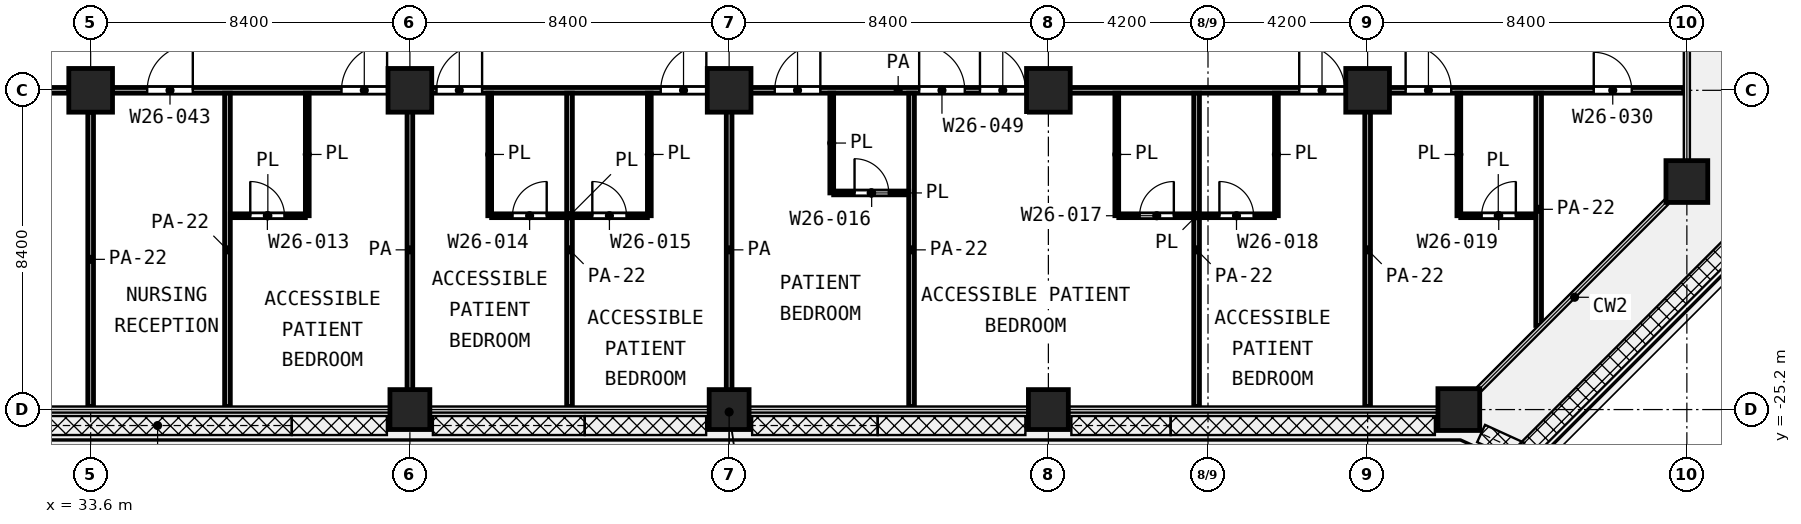
"""IFC4 building model, lengths in metres.
Left out: names, types, materials, properties, quantities, classifications, styles, units other than length and angle.
Written with IfcOpenShell. Run it as: python <this file> out.ifc"""

import sys

from ifc_helpers import new_model, si_unit, direction, frame, frame_2d, origin, origin_2d, place, context, subcontext, project, spatial, rectangle, extrude, element, fill, save


model = new_model("IFC4")
c1 = context("Model", 3, precision=1e-05, world=origin(), true_north=direction((0.0, 1.0)))
c2 = subcontext(c1, "Body", "Model", "MODEL_VIEW")
j1 = project(units=[si_unit("LENGTHUNIT", "METRE"), si_unit("PLANEANGLEUNIT", "RADIAN")], contexts=[c1])
p1 = place(None, origin())
s1 = spatial("IfcSite", under=j1, at=p1, CompositionType="ELEMENT")
p2 = place(p1, origin())
s2 = spatial("IfcBuilding", under=s1, at=p2, CompositionType="ELEMENT")
p3 = place(p2, frame((0.0, 0.0, 136.6)))
s3 = spatial("IfcBuildingStorey", under=s2, at=p3, CompositionType="ELEMENT", Elevation=136.6)
for number, where, z_axis, x_axis in (
    (1, (33.6, -16.8, 0.0), (0.0, 0.0, 1.0), (1.0, 0.0, 0.0)),
    (2, (42.0, -16.8, 0.0), (0.0, 0.0, 1.0), (1.0, 0.0, 0.0)),
    (3, (50.4, -16.8, 0.0), (0.0, 0.0, 1.0), (1.0, 0.0, 0.0)),
    (4, (58.8, -16.8, 0.0), (0.0, 0.0, 1.0), (1.0, 0.0, 0.0)),
    (5, (67.2, -16.8, 0.0), (0.0, 0.0, 1.0), (1.0, 0.0, 0.0)),
):
    element("IfcColumn", number, at=place(p3, frame(where, z_axis=z_axis, x_axis=x_axis)), inside=s3, PredefinedType="COLUMN", context=c2, shape_type="SweptSolid", body=[
        extrude(rectangle(XDim=1.15, YDim=1.15, at=origin_2d()), origin(), (0.0, 0.0, 1.0), 4.2),
    ])
p4 = place(p3, frame((75.6, -19.2, 0.0), z_axis=(0.0, 0.0, 1.0), x_axis=(1.0, 0.0, 0.0)))
e6 = element("IfcColumn", 6, at=p4, inside=s3, PredefinedType="COLUMN", context=c2, shape_type="SweptSolid", body=[
    extrude(rectangle(XDim=1.1, YDim=1.1, at=origin_2d()), origin(), (0.0, 0.0, 1.0), 4.2),
])
for number, where, z_axis, x_axis in (
    (7, (42.0, -25.2, 0.0), (0.0, 0.0, 1.0), (1.0, 0.0, 0.0)),
    (8, (50.4, -25.2, 0.0), (0.0, 0.0, 1.0), (1.0, 0.0, 0.0)),
    (9, (58.8, -25.2, 0.0), (0.0, 0.0, 1.0), (1.0, 0.0, 0.0)),
):
    element("IfcColumn", number, at=place(p3, frame(where, z_axis=z_axis, x_axis=x_axis)), inside=s3, PredefinedType="COLUMN", context=c2, shape_type="SweptSolid", body=[
        extrude(rectangle(XDim=1.05, YDim=1.05, at=origin_2d()), origin(), (0.0, 0.0, 1.0), 4.2),
    ])
p5 = place(p3, frame((69.6, -25.2, 0.0), z_axis=(0.0, 0.0, 1.0), x_axis=(1.0, 0.0, 0.0)))
e10 = element("IfcColumn", 10, at=p5, inside=s3, PredefinedType="COLUMN", context=c2, shape_type="SweptSolid", body=[
    extrude(rectangle(XDim=1.1, YDim=1.1, at=origin_2d()), origin(), (0.0, 0.0, 1.0), 4.2),
])
p6 = place(p3, frame((37.275, -20.1, 0.0), z_axis=(0.0, 0.0, 1.0), x_axis=(1.0, 0.0, 0.0)))
e11 = element("IfcWall", 11, at=p6, inside=s3, PredefinedType="PARTITIONING", context=c2, shape_type="SweptSolid", body=[
    extrude(rectangle(XDim=1.975, YDim=0.1, at=frame_2d((0.988, 0.0))), origin(), (0.0, 0.0, 1.0), 3.6),
])
p7 = place(p6, frame((0.525, 0.0, 0.0)))
e12 = element("IfcOpeningElement", 12, at=p7, cuts=e11, PredefinedType="OPENING", context=c2, shape_type="SweptSolid", body=[
    extrude(rectangle(XDim=0.9, YDim=2.1, at=frame_2d((0.45, 1.05))), frame((0.0, 0.06, 0.0), z_axis=(0.0, -1.0, 0.0), x_axis=(1.0, 0.0, 0.0)), (0.0, 0.0, 1.0), 0.12),
])
p8 = place(p3, frame((44.15, -20.1, 0.0), z_axis=(0.0, 0.0, 1.0), x_axis=(1.0, 0.0, 0.0)))
e13 = element("IfcWall", 13, at=p8, inside=s3, PredefinedType="PARTITIONING", context=c2, shape_type="SweptSolid", body=[
    extrude(rectangle(XDim=4.1, YDim=0.1, at=frame_2d((2.05, 0.0))), origin(), (0.0, 0.0, 1.0), 3.6),
])
p9 = place(p8, frame((0.55, 0.0, 0.0)))
e14 = element("IfcOpeningElement", 14, at=p9, cuts=e13, PredefinedType="OPENING", context=c2, shape_type="SweptSolid", body=[
    extrude(rectangle(XDim=0.9, YDim=2.1, at=frame_2d((0.45, 1.05))), frame((0.0, 0.06, 0.0), z_axis=(0.0, -1.0, 0.0), x_axis=(1.0, 0.0, 0.0)), (0.0, 0.0, 1.0), 0.12),
])
p10 = place(p8, frame((2.65, 0.0, 0.0)))
e15 = element("IfcOpeningElement", 15, at=p10, cuts=e13, PredefinedType="OPENING", context=c2, shape_type="SweptSolid", body=[
    extrude(rectangle(XDim=0.9, YDim=2.1, at=frame_2d((0.45, 1.05))), frame((0.0, 0.06, 0.0), z_axis=(0.0, -1.0, 0.0), x_axis=(1.0, 0.0, 0.0)), (0.0, 0.0, 1.0), 0.12),
])
p11 = place(p3, frame((60.652, -20.1, 0.0), z_axis=(0.0, 0.0, 1.0), x_axis=(1.0, 0.0, 0.0)))
e16 = element("IfcWall", 16, at=p11, inside=s3, PredefinedType="PARTITIONING", context=c2, shape_type="SweptSolid", body=[
    extrude(rectangle(XDim=4.098, YDim=0.1, at=frame_2d((2.049, 0.0))), origin(), (0.0, 0.0, 1.0), 3.6),
])
p12 = place(p11, frame((0.549, 0.0, 0.0)))
e17 = element("IfcOpeningElement", 17, at=p12, cuts=e16, PredefinedType="OPENING", context=c2, shape_type="SweptSolid", body=[
    extrude(rectangle(XDim=0.9, YDim=2.1, at=frame_2d((0.45, 1.05))), frame((0.0, 0.06, 0.0), z_axis=(0.0, -1.0, 0.0), x_axis=(1.0, 0.0, 0.0)), (0.0, 0.0, 1.0), 0.12),
])
p13 = place(p11, frame((2.648, 0.0, 0.0)))
e18 = element("IfcOpeningElement", 18, at=p13, cuts=e16, PredefinedType="OPENING", context=c2, shape_type="SweptSolid", body=[
    extrude(rectangle(XDim=0.9, YDim=2.1, at=frame_2d((0.45, 1.05))), frame((0.0, 0.06, 0.0), z_axis=(0.0, -1.0, 0.0), x_axis=(1.0, 0.0, 0.0)), (0.0, 0.0, 1.0), 0.12),
])
p14 = place(p3, frame((69.65, -20.1, 0.0), z_axis=(0.0, 0.0, 1.0), x_axis=(1.0, 0.0, 0.0)))
e19 = element("IfcWall", 19, at=p14, inside=s3, PredefinedType="PARTITIONING", context=c2, shape_type="SweptSolid", body=[
    extrude(rectangle(XDim=1.975, YDim=0.1, at=frame_2d((0.988, 0.0))), origin(), (0.0, 0.0, 1.0), 3.6),
])
p15 = place(p14, frame((0.55, 0.0, 0.0)))
e20 = element("IfcOpeningElement", 20, at=p15, cuts=e19, PredefinedType="OPENING", context=c2, shape_type="SweptSolid", body=[
    extrude(rectangle(XDim=0.9, YDim=2.1, at=frame_2d((0.45, 1.05))), frame((0.0, 0.06, 0.0), z_axis=(0.0, -1.0, 0.0), x_axis=(1.0, 0.0, 0.0)), (0.0, 0.0, 1.0), 0.12),
])
p16 = place(p3, frame((53.15, -19.5, 0.0), z_axis=(0.0, 0.0, 1.0), x_axis=(1.0, 0.0, 0.0)))
e21 = element("IfcWall", 21, at=p16, inside=s3, PredefinedType="PARTITIONING", context=c2, shape_type="SweptSolid", body=[
    extrude(rectangle(XDim=1.975, YDim=0.1, at=frame_2d((0.988, 0.0))), origin(), (0.0, 0.0, 1.0), 3.6),
])
p17 = place(p16, frame((0.55, 0.0, 0.0)))
e22 = element("IfcOpeningElement", 22, at=p17, cuts=e21, PredefinedType="OPENING", context=c2, shape_type="SweptSolid", body=[
    extrude(rectangle(XDim=0.9, YDim=2.1, at=frame_2d((0.45, 1.05))), frame((0.0, 0.06, 0.0), z_axis=(0.0, -1.0, 0.0), x_axis=(1.0, 0.0, 0.0)), (0.0, 0.0, 1.0), 0.12),
])
for number, where, z_axis, x_axis in (
    (23, (39.3, -20.1, 0.0), (0.0, 0.0, 1.0), (0.0, 1.0, 0.0)),
    (24, (44.1, -20.1, 0.0), (0.0, 0.0, 1.0), (0.0, 1.0, 0.0)),
    (25, (48.3, -20.1, 0.0), (0.0, 0.0, 1.0), (0.0, 1.0, 0.0)),
):
    element("IfcWall", number, at=place(p3, frame(where, z_axis=z_axis, x_axis=x_axis)), inside=s3, PredefinedType="PARTITIONING", context=c2, shape_type="SweptSolid", body=[
        extrude(rectangle(XDim=3.225, YDim=0.1, at=frame_2d((1.613, 0.0))), origin(), (0.0, 0.0, 1.0), 3.6),
    ])
p18 = place(p3, frame((53.1, -19.5, 0.0), z_axis=(0.0, 0.0, 1.0), x_axis=(0.0, 1.0, 0.0)))
e26 = element("IfcWall", 26, at=p18, inside=s3, PredefinedType="PARTITIONING", context=c2, shape_type="SweptSolid", body=[
    extrude(rectangle(XDim=2.625, YDim=0.1, at=frame_2d((1.312, 0.0))), origin(), (0.0, 0.0, 1.0), 3.6),
])
p19 = place(p3, frame((60.6, -20.099, 0.0), z_axis=(0.0, 0.0, 1.0), x_axis=(0.0, 1.0, 0.0)))
e27 = element("IfcWall", 27, at=p19, inside=s3, PredefinedType="PARTITIONING", context=c2, shape_type="SweptSolid", body=[
    extrude(rectangle(XDim=3.224, YDim=0.1, at=frame_2d((1.612, 0.0))), origin(), (0.0, 0.0, 1.0), 3.6),
])
for number, where, z_axis, x_axis in (
    (28, (64.8, -20.1, 0.0), (0.0, 0.0, 1.0), (0.0, 1.0, 0.0)),
    (29, (69.6, -20.1, 0.0), (0.0, 0.0, 1.0), (0.0, 1.0, 0.0)),
):
    element("IfcWall", number, at=place(p3, frame(where, z_axis=z_axis, x_axis=x_axis)), inside=s3, PredefinedType="PARTITIONING", context=c2, shape_type="SweptSolid", body=[
        extrude(rectangle(XDim=3.225, YDim=0.1, at=frame_2d((1.613, 0.0))), origin(), (0.0, 0.0, 1.0), 3.6),
    ])
p20 = place(p3, frame((25.0, -16.8, 0.0), z_axis=(0.0, 0.0, 1.0), x_axis=(1.0, 0.0, 0.0)))
e30 = element("IfcWall", 30, at=p20, inside=s3, PredefinedType="PARTITIONING", context=c2, shape_type="SweptSolid", body=[
    extrude(rectangle(XDim=8.025, YDim=0.15, at=frame_2d((4.012, 0.0))), origin(), (0.0, 0.0, 1.0), 3.6),
])
p21 = place(p20, frame((1.55, 0.0, 0.0)))
e31 = element("IfcOpeningElement", 31, at=p21, cuts=e30, PredefinedType="OPENING", context=c2, shape_type="SweptSolid", body=[
    extrude(rectangle(XDim=1.5, YDim=2.1, at=frame_2d((0.75, 1.05))), frame((0.0, 0.085, 0.0), z_axis=(0.0, -1.0, 0.0), x_axis=(1.0, 0.0, 0.0)), (0.0, 0.0, 1.0), 0.17),
])
p22 = place(p20, frame((5.762, 0.0, 0.0)))
e32 = element("IfcOpeningElement", 32, at=p22, cuts=e30, PredefinedType="OPENING", context=c2, shape_type="SweptSolid", body=[
    extrude(rectangle(XDim=0.9, YDim=2.1, at=frame_2d((0.45, 1.05))), frame((0.0, 0.085, 0.0), z_axis=(0.0, -1.0, 0.0), x_axis=(1.0, 0.0, 0.0)), (0.0, 0.0, 1.0), 0.17),
])
p23 = place(p3, frame((34.175, -16.8, 0.0), z_axis=(0.0, 0.0, 1.0), x_axis=(1.0, 0.0, 0.0)))
e33 = element("IfcWall", 33, at=p23, inside=s3, PredefinedType="PARTITIONING", context=c2, shape_type="SweptSolid", body=[
    extrude(rectangle(XDim=41.345, YDim=0.15, at=frame_2d((20.672, 0.0))), origin(), (0.0, 0.0, 1.0), 3.6),
])
p24 = place(p23, frame((0.913, 0.0, 0.0)))
e34 = element("IfcOpeningElement", 34, at=p24, cuts=e33, PredefinedType="OPENING", context=c2, shape_type="SweptSolid", body=[
    extrude(rectangle(XDim=1.2, YDim=2.1, at=frame_2d((0.6, 1.05))), frame((0.0, 0.085, 0.0), z_axis=(0.0, -1.0, 0.0), x_axis=(1.0, 0.0, 0.0)), (0.0, 0.0, 1.0), 0.17),
])
p25 = place(p23, frame((6.025, 0.0, 0.0)))
e35 = element("IfcOpeningElement", 35, at=p25, cuts=e33, PredefinedType="OPENING", context=c2, shape_type="SweptSolid", body=[
    extrude(rectangle(XDim=1.2, YDim=2.1, at=frame_2d((0.6, 1.05))), frame((0.0, 0.085, 0.0), z_axis=(0.0, -1.0, 0.0), x_axis=(1.0, 0.0, 0.0)), (0.0, 0.0, 1.0), 0.17),
])
p26 = place(p23, frame((8.525, 0.0, 0.0)))
e36 = element("IfcOpeningElement", 36, at=p26, cuts=e33, PredefinedType="OPENING", context=c2, shape_type="SweptSolid", body=[
    extrude(rectangle(XDim=1.2, YDim=2.1, at=frame_2d((0.6, 1.05))), frame((0.0, 0.085, 0.0), z_axis=(0.0, -1.0, 0.0), x_axis=(1.0, 0.0, 0.0)), (0.0, 0.0, 1.0), 0.17),
])
p27 = place(p23, frame((14.425, 0.0, 0.0)))
e37 = element("IfcOpeningElement", 37, at=p27, cuts=e33, PredefinedType="OPENING", context=c2, shape_type="SweptSolid", body=[
    extrude(rectangle(XDim=1.2, YDim=2.1, at=frame_2d((0.6, 1.05))), frame((0.0, 0.085, 0.0), z_axis=(0.0, -1.0, 0.0), x_axis=(1.0, 0.0, 0.0)), (0.0, 0.0, 1.0), 0.17),
])
p28 = place(p23, frame((17.425, 0.0, 0.0)))
e38 = element("IfcOpeningElement", 38, at=p28, cuts=e33, PredefinedType="OPENING", context=c2, shape_type="SweptSolid", body=[
    extrude(rectangle(XDim=1.2, YDim=2.1, at=frame_2d((0.6, 1.05))), frame((0.0, 0.085, 0.0), z_axis=(0.0, -1.0, 0.0), x_axis=(1.0, 0.0, 0.0)), (0.0, 0.0, 1.0), 0.17),
])
p29 = place(p23, frame((22.825, 0.0, 0.0)))
e39 = element("IfcOpeningElement", 39, at=p29, cuts=e33, PredefinedType="OPENING", context=c2, shape_type="SweptSolid", body=[
    extrude(rectangle(XDim=1.2, YDim=2.1, at=frame_2d((0.6, 1.05))), frame((0.0, 0.085, 0.0), z_axis=(0.0, -1.0, 0.0), x_axis=(1.0, 0.0, 0.0)), (0.0, 0.0, 1.0), 0.17),
])
p30 = place(p23, frame((21.225, 0.0, 0.0)))
e40 = element("IfcOpeningElement", 40, at=p30, cuts=e33, PredefinedType="OPENING", context=c2, shape_type="SweptSolid", body=[
    extrude(rectangle(XDim=1.2, YDim=2.1, at=frame_2d((0.6, 1.05))), frame((0.0, 0.085, 0.0), z_axis=(0.0, -1.0, 0.0), x_axis=(1.0, 0.0, 0.0)), (0.0, 0.0, 1.0), 0.17),
])
p31 = place(p23, frame((31.225, 0.0, 0.0)))
e41 = element("IfcOpeningElement", 41, at=p31, cuts=e33, PredefinedType="OPENING", context=c2, shape_type="SweptSolid", body=[
    extrude(rectangle(XDim=1.2, YDim=2.1, at=frame_2d((0.6, 1.05))), frame((0.0, 0.085, 0.0), z_axis=(0.0, -1.0, 0.0), x_axis=(1.0, 0.0, 0.0)), (0.0, 0.0, 1.0), 0.17),
])
p32 = place(p23, frame((34.025, 0.0, 0.0)))
e42 = element("IfcOpeningElement", 42, at=p32, cuts=e33, PredefinedType="OPENING", context=c2, shape_type="SweptSolid", body=[
    extrude(rectangle(XDim=1.2, YDim=2.1, at=frame_2d((0.6, 1.05))), frame((0.0, 0.085, 0.0), z_axis=(0.0, -1.0, 0.0), x_axis=(1.0, 0.0, 0.0)), (0.0, 0.0, 1.0), 0.17),
])
p33 = place(p23, frame((38.975, 0.0, 0.0)))
e43 = element("IfcOpeningElement", 43, at=p33, cuts=e33, PredefinedType="OPENING", context=c2, shape_type="SweptSolid", body=[
    extrude(rectangle(XDim=1.0, YDim=2.1, at=frame_2d((0.5, 1.05))), frame((0.0, 0.085, 0.0), z_axis=(0.0, -1.0, 0.0), x_axis=(1.0, 0.0, 0.0)), (0.0, 0.0, 1.0), 0.17),
])
p34 = place(p3, frame((33.6, -25.12, 0.0), z_axis=(0.0, 0.0, 1.0), x_axis=(0.0, 1.0, 0.0)))
e44 = element("IfcWall", 44, at=p34, inside=s3, PredefinedType="PARTITIONING", context=c2, shape_type="SweptSolid", body=[
    extrude(rectangle(XDim=7.745, YDim=0.15, at=frame_2d((3.873, 0.0))), origin(), (0.0, 0.0, 1.0), 2.7),
])
p35 = place(p3, frame((37.2, -25.12, 0.0), z_axis=(0.0, 0.0, 1.0), x_axis=(0.0, 1.0, 0.0)))
e45 = element("IfcWall", 45, at=p35, inside=s3, PredefinedType="PARTITIONING", context=c2, shape_type="SweptSolid", body=[
    extrude(rectangle(XDim=8.245, YDim=0.15, at=frame_2d((4.123, 0.0))), origin(), (0.0, 0.0, 1.0), 2.7),
])
p36 = place(p3, frame((42.0, -25.12, 0.0), z_axis=(0.0, 0.0, 1.0), x_axis=(0.0, 1.0, 0.0)))
e46 = element("IfcWall", 46, at=p36, inside=s3, PredefinedType="PARTITIONING", context=c2, shape_type="SweptSolid", body=[
    extrude(rectangle(XDim=8.245, YDim=0.15, at=frame_2d((4.123, 0.0))), origin(), (0.0, 0.0, 1.0), 3.6),
])
p37 = place(p3, frame((46.2, -25.12, 0.0), z_axis=(0.0, 0.0, 1.0), x_axis=(0.0, 1.0, 0.0)))
e47 = element("IfcWall", 47, at=p37, inside=s3, PredefinedType="PARTITIONING", context=c2, shape_type="SweptSolid", body=[
    extrude(rectangle(XDim=8.245, YDim=0.15, at=frame_2d((4.123, 0.0))), origin(), (0.0, 0.0, 1.0), 2.7),
])
p38 = place(p3, frame((50.4, -25.12, 0.0), z_axis=(0.0, 0.0, 1.0), x_axis=(0.0, 1.0, 0.0)))
e48 = element("IfcWall", 48, at=p38, inside=s3, PredefinedType="PARTITIONING", context=c2, shape_type="SweptSolid", body=[
    extrude(rectangle(XDim=8.245, YDim=0.15, at=frame_2d((4.123, 0.0))), origin(), (0.0, 0.0, 1.0), 3.6),
])
for number, where, z_axis, x_axis in (
    (49, (55.2, -25.12, 0.0), (0.0, 0.0, 1.0), (0.0, 1.0, 0.0)),
    (50, (62.7, -25.12, 0.0), (0.0, 0.0, 1.0), (0.0, 1.0, 0.0)),
    (51, (67.2, -25.12, 0.0), (0.0, 0.0, 1.0), (0.0, 1.0, 0.0)),
):
    element("IfcWall", number, at=place(p3, frame(where, z_axis=z_axis, x_axis=x_axis)), inside=s3, PredefinedType="PARTITIONING", context=c2, shape_type="SweptSolid", body=[
        extrude(rectangle(XDim=8.245, YDim=0.15, at=frame_2d((4.123, 0.0))), origin(), (0.0, 0.0, 1.0), 2.7),
    ])
p39 = place(p3, frame((71.7, -22.987, 0.0), z_axis=(0.0, 0.0, 1.0), x_axis=(0.0, 1.0, 0.0)))
e52 = element("IfcWall", 52, at=p39, inside=s3, PredefinedType="PARTITIONING", context=c2, shape_type="SweptSolid", body=[
    extrude(rectangle(XDim=6.112, YDim=0.15, at=frame_2d((3.056, 0.0))), origin(), (0.0, 0.0, 1.0), 2.7),
])
p40 = place(p24, origin())
e53 = element("IfcDoor", 53, at=p40, inside=s3, OperationType="SINGLE_SWING_RIGHT", PredefinedType="DOOR", context=c2, shape_type="SweptSolid", body=[
    extrude(rectangle(XDim=1.2, YDim=2.1, at=frame_2d((0.6, 1.05))), frame((0.0, 0.025, 0.0), z_axis=(0.0, -1.0, 0.0), x_axis=(1.0, 0.0, 0.0)), (0.0, 0.0, 1.0), 0.05),
])
fill(e34, e53)
p41 = place(p25, origin())
e54 = element("IfcDoor", 54, at=p41, inside=s3, OperationType="SINGLE_SWING_RIGHT", PredefinedType="DOOR", context=c2, shape_type="SweptSolid", body=[
    extrude(rectangle(XDim=1.2, YDim=2.1, at=frame_2d((0.6, 1.05))), frame((0.0, 0.025, 0.0), z_axis=(0.0, -1.0, 0.0), x_axis=(1.0, 0.0, 0.0)), (0.0, 0.0, 1.0), 0.05),
])
fill(e35, e54)
p42 = place(p7, origin())
e55 = element("IfcDoor", 55, at=p42, inside=s3, OperationType="SINGLE_SWING_LEFT", PredefinedType="DOOR", context=c2, shape_type="SweptSolid", body=[
    extrude(rectangle(XDim=0.9, YDim=2.1, at=frame_2d((0.45, 1.05))), frame((0.0, 0.025, 0.0), z_axis=(0.0, -1.0, 0.0), x_axis=(1.0, 0.0, 0.0)), (0.0, 0.0, 1.0), 0.05),
])
fill(e12, e55)
p43 = place(p26, origin())
e56 = element("IfcDoor", 56, at=p43, inside=s3, OperationType="SINGLE_SWING_RIGHT", PredefinedType="DOOR", context=c2, shape_type="SweptSolid", body=[
    extrude(rectangle(XDim=1.2, YDim=2.1, at=frame_2d((0.6, 1.05))), frame((0.0, 0.025, 0.0), z_axis=(0.0, -1.0, 0.0), x_axis=(1.0, 0.0, 0.0)), (0.0, 0.0, 1.0), 0.05),
])
fill(e36, e56)
p44 = place(p9, origin())
e57 = element("IfcDoor", 57, at=p44, inside=s3, OperationType="SINGLE_SWING_RIGHT", PredefinedType="DOOR", context=c2, shape_type="SweptSolid", body=[
    extrude(rectangle(XDim=0.9, YDim=2.1, at=frame_2d((0.45, 1.05))), frame((0.0, 0.025, 0.0), z_axis=(0.0, -1.0, 0.0), x_axis=(1.0, 0.0, 0.0)), (0.0, 0.0, 1.0), 0.05),
])
fill(e14, e57)
p45 = place(p27, origin())
e58 = element("IfcDoor", 58, at=p45, inside=s3, OperationType="SINGLE_SWING_RIGHT", PredefinedType="DOOR", context=c2, shape_type="SweptSolid", body=[
    extrude(rectangle(XDim=1.2, YDim=2.1, at=frame_2d((0.6, 1.05))), frame((0.0, 0.025, 0.0), z_axis=(0.0, -1.0, 0.0), x_axis=(1.0, 0.0, 0.0)), (0.0, 0.0, 1.0), 0.05),
])
fill(e37, e58)
p46 = place(p10, origin())
e59 = element("IfcDoor", 59, at=p46, inside=s3, OperationType="SINGLE_SWING_LEFT", PredefinedType="DOOR", context=c2, shape_type="SweptSolid", body=[
    extrude(rectangle(XDim=0.9, YDim=2.1, at=frame_2d((0.45, 1.05))), frame((0.0, 0.025, 0.0), z_axis=(0.0, -1.0, 0.0), x_axis=(1.0, 0.0, 0.0)), (0.0, 0.0, 1.0), 0.05),
])
fill(e15, e59)
p47 = place(p28, origin())
e60 = element("IfcDoor", 60, at=p47, inside=s3, OperationType="SINGLE_SWING_RIGHT", PredefinedType="DOOR", context=c2, shape_type="SweptSolid", body=[
    extrude(rectangle(XDim=1.2, YDim=2.1, at=frame_2d((0.6, 1.05))), frame((0.0, 0.025, 0.0), z_axis=(0.0, -1.0, 0.0), x_axis=(1.0, 0.0, 0.0)), (0.0, 0.0, 1.0), 0.05),
])
fill(e38, e60)
p48 = place(p17, origin())
e61 = element("IfcDoor", 61, at=p48, inside=s3, OperationType="SINGLE_SWING_LEFT", PredefinedType="DOOR", context=c2, shape_type="SweptSolid", body=[
    extrude(rectangle(XDim=0.9, YDim=2.1, at=frame_2d((0.45, 1.05))), frame((0.0, 0.025, 0.0), z_axis=(0.0, -1.0, 0.0), x_axis=(1.0, 0.0, 0.0)), (0.0, 0.0, 1.0), 0.05),
])
fill(e22, e61)
p49 = place(p29, origin())
e62 = element("IfcDoor", 62, at=p49, inside=s3, OperationType="SINGLE_SWING_LEFT", PredefinedType="DOOR", context=c2, shape_type="SweptSolid", body=[
    extrude(rectangle(XDim=1.2, YDim=2.1, at=frame_2d((0.6, 1.05))), frame((0.0, 0.025, 0.0), z_axis=(0.0, -1.0, 0.0), x_axis=(1.0, 0.0, 0.0)), (0.0, 0.0, 1.0), 0.05),
])
fill(e39, e62)
p50 = place(p30, origin())
e63 = element("IfcDoor", 63, at=p50, inside=s3, OperationType="SINGLE_SWING_LEFT", PredefinedType="DOOR", context=c2, shape_type="SweptSolid", body=[
    extrude(rectangle(XDim=1.2, YDim=2.1, at=frame_2d((0.6, 1.05))), frame((0.0, 0.025, 0.0), z_axis=(0.0, -1.0, 0.0), x_axis=(1.0, 0.0, 0.0)), (0.0, 0.0, 1.0), 0.05),
])
fill(e40, e63)
p51 = place(p12, origin())
e64 = element("IfcDoor", 64, at=p51, inside=s3, OperationType="SINGLE_SWING_RIGHT", PredefinedType="DOOR", context=c2, shape_type="SweptSolid", body=[
    extrude(rectangle(XDim=0.9, YDim=2.1, at=frame_2d((0.45, 1.05))), frame((0.0, 0.025, 0.0), z_axis=(0.0, -1.0, 0.0), x_axis=(1.0, 0.0, 0.0)), (0.0, 0.0, 1.0), 0.05),
])
fill(e17, e64)
p52 = place(p31, origin())
e65 = element("IfcDoor", 65, at=p52, inside=s3, OperationType="SINGLE_SWING_LEFT", PredefinedType="DOOR", context=c2, shape_type="SweptSolid", body=[
    extrude(rectangle(XDim=1.2, YDim=2.1, at=frame_2d((0.6, 1.05))), frame((0.0, 0.025, 0.0), z_axis=(0.0, -1.0, 0.0), x_axis=(1.0, 0.0, 0.0)), (0.0, 0.0, 1.0), 0.05),
])
fill(e41, e65)
p53 = place(p13, origin())
e66 = element("IfcDoor", 66, at=p53, inside=s3, OperationType="SINGLE_SWING_LEFT", PredefinedType="DOOR", context=c2, shape_type="SweptSolid", body=[
    extrude(rectangle(XDim=0.9, YDim=2.1, at=frame_2d((0.45, 1.05))), frame((0.0, 0.025, 0.0), z_axis=(0.0, -1.0, 0.0), x_axis=(1.0, 0.0, 0.0)), (0.0, 0.0, 1.0), 0.05),
])
fill(e18, e66)
p54 = place(p32, origin())
e67 = element("IfcDoor", 67, at=p54, inside=s3, OperationType="SINGLE_SWING_LEFT", PredefinedType="DOOR", context=c2, shape_type="SweptSolid", body=[
    extrude(rectangle(XDim=1.2, YDim=2.1, at=frame_2d((0.6, 1.05))), frame((0.0, 0.025, 0.0), z_axis=(0.0, -1.0, 0.0), x_axis=(1.0, 0.0, 0.0)), (0.0, 0.0, 1.0), 0.05),
])
fill(e42, e67)
p55 = place(p15, origin())
e68 = element("IfcDoor", 68, at=p55, inside=s3, OperationType="SINGLE_SWING_RIGHT", PredefinedType="DOOR", context=c2, shape_type="SweptSolid", body=[
    extrude(rectangle(XDim=0.9, YDim=2.1, at=frame_2d((0.45, 1.05))), frame((0.0, 0.025, 0.0), z_axis=(0.0, -1.0, 0.0), x_axis=(1.0, 0.0, 0.0)), (0.0, 0.0, 1.0), 0.05),
])
fill(e20, e68)
p56 = place(p33, origin())
e69 = element("IfcDoor", 69, at=p56, inside=s3, OperationType="SINGLE_SWING_LEFT", PredefinedType="DOOR", context=c2, shape_type="SweptSolid", body=[
    extrude(rectangle(XDim=1.0, YDim=2.1, at=frame_2d((0.5, 1.05))), frame((0.0, 0.025, 0.0), z_axis=(0.0, -1.0, 0.0), x_axis=(1.0, 0.0, 0.0)), (0.0, 0.0, 1.0), 0.05),
])
fill(e43, e69)
save(model, sys.argv[1])
